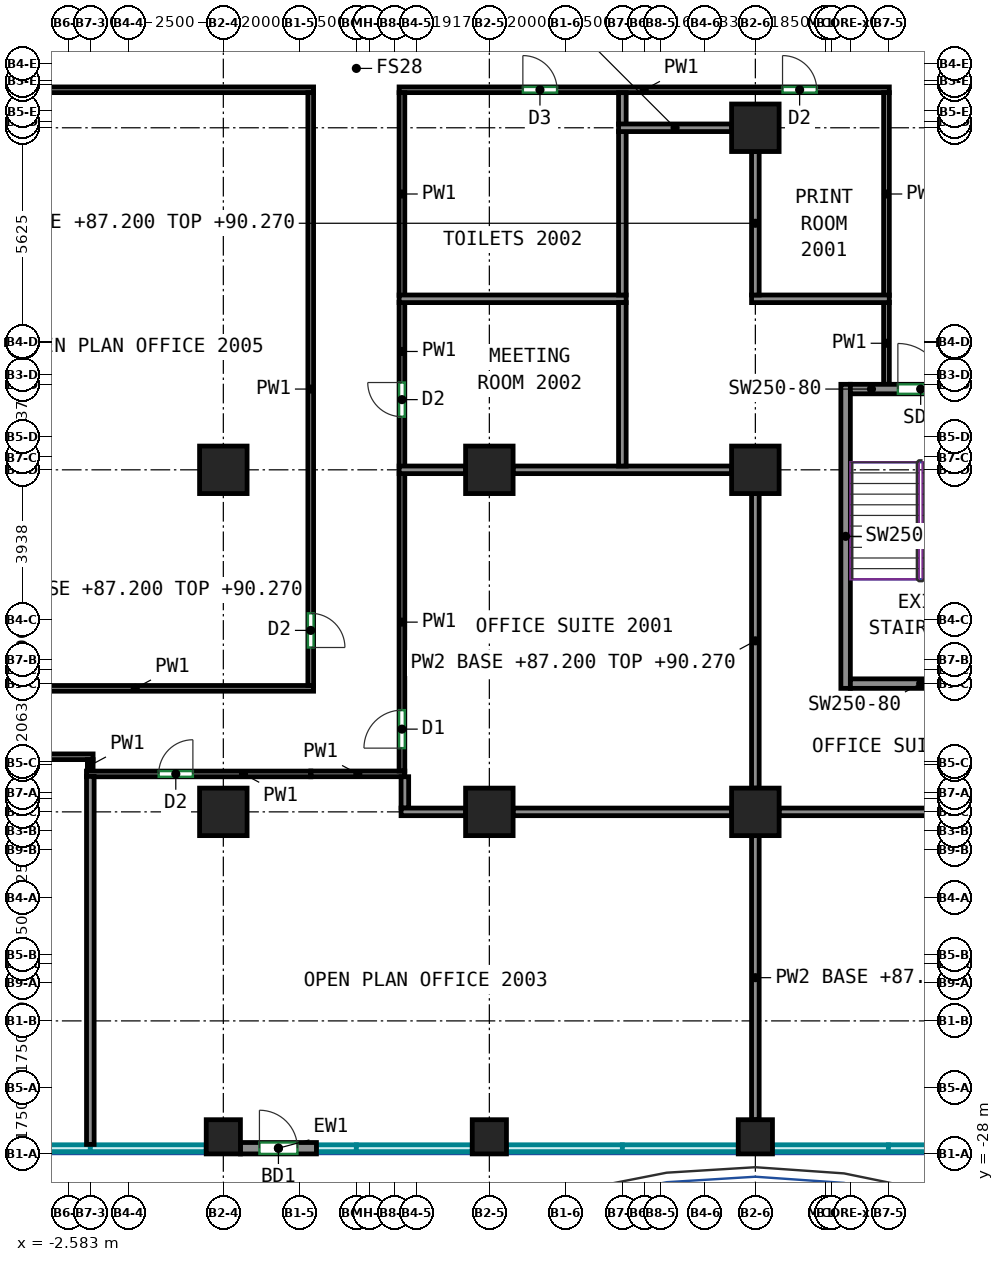
"""IFC4 building model, lengths in metres.
Left out: names, types, materials, properties, quantities, classifications, styles, units other than length and angle.
Written with IfcOpenShell. Run it as: python <this file> out.ifc"""

import sys

from ifc_helpers import new_model, si_unit, direction, frame, frame_2d, origin, origin_2d, place, context, subcontext, project, spatial, rectangle, extrude, source, transform, mapped, element, fill, save


model = new_model("IFC4")
c1 = context("Model", 3, precision=1e-05, world=origin(), true_north=direction((0.0, 1.0)))
c2 = subcontext(c1, "Body", "Model", "MODEL_VIEW")
j1 = project(units=[si_unit("LENGTHUNIT", "METRE"), si_unit("PLANEANGLEUNIT", "RADIAN")], contexts=[c1])
p1 = place(None, origin())
s1 = spatial("IfcSite", under=j1, at=p1, CompositionType="ELEMENT")
p2 = place(p1, origin())
s2 = spatial("IfcBuilding", under=s1, at=p2, CompositionType="ELEMENT")
p3 = place(p2, frame((0.0, 0.0, 87.2)))
s3 = spatial("IfcBuildingStorey", under=s2, at=p3, CompositionType="ELEMENT", Elevation=87.2)
m1 = source(origin(), c2, "Body", "SweptSolid", [
    extrude(rectangle(XDim=0.9, YDim=0.9, at=origin_2d()), origin(), (0.0, 0.0, 1.0), 3.72),
])
p4 = place(p3, frame((1.5, -27.55, 0.0), z_axis=(0.0, 0.0, 1.0), x_axis=(1.0, 0.0, 0.0)))
e1 = element("IfcColumn", 1, at=p4, inside=s3, PredefinedType="COLUMN", context=c2, shape_type="MappedRepresentation", body=[
    mapped(m1, transform((0.0, 0.0, 0.0))),
])
m2 = source(origin(), c2, "Body", "SweptSolid", [
    extrude(rectangle(XDim=1.25, YDim=1.25, at=origin_2d()), origin(), (0.0, 0.0, 1.0), 3.72),
])
for number, where, z_axis, x_axis in (
    (2, (1.5, -19.0, 0.0), (0.0, 0.0, 1.0), (1.0, 0.0, 0.0)),
    (3, (1.5, -10.0, 0.0), (0.0, 0.0, 1.0), (1.0, 0.0, 0.0)),
):
    element("IfcColumn", number, at=place(p3, frame(where, z_axis=z_axis, x_axis=x_axis)), inside=s3, PredefinedType="COLUMN", context=c2, shape_type="MappedRepresentation", body=[
        mapped(m2, transform((0.0, 0.0, 0.0))),
    ])
p5 = place(p3, frame((8.5, -27.55, 0.0), z_axis=(0.0, 0.0, 1.0), x_axis=(1.0, 0.0, 0.0)))
e4 = element("IfcColumn", 4, at=p5, inside=s3, PredefinedType="COLUMN", context=c2, shape_type="MappedRepresentation", body=[
    mapped(m1, transform((0.0, 0.0, 0.0))),
])
for number, where, z_axis, x_axis in (
    (5, (8.5, -19.0, 0.0), (0.0, 0.0, 1.0), (1.0, 0.0, 0.0)),
    (6, (8.5, -10.0, 0.0), (0.0, 0.0, 1.0), (1.0, 0.0, 0.0)),
):
    element("IfcColumn", number, at=place(p3, frame(where, z_axis=z_axis, x_axis=x_axis)), inside=s3, PredefinedType="COLUMN", context=c2, shape_type="MappedRepresentation", body=[
        mapped(m2, transform((0.0, 0.0, 0.0))),
    ])
p6 = place(p3, frame((15.5, -27.55, 0.0), z_axis=(0.0, 0.0, 1.0), x_axis=(1.0, 0.0, 0.0)))
e7 = element("IfcColumn", 7, at=p6, inside=s3, PredefinedType="COLUMN", context=c2, shape_type="MappedRepresentation", body=[
    mapped(m1, transform((0.0, 0.0, 0.0))),
])
for number, where, z_axis, x_axis in (
    (8, (15.5, -19.0, 0.0), (0.0, 0.0, 1.0), (1.0, 0.0, 0.0)),
    (9, (15.5, -10.0, 0.0), (0.0, 0.0, 1.0), (1.0, 0.0, 0.0)),
    (10, (15.5, -1.0, 0.0), (0.0, 0.0, 1.0), (1.0, 0.0, 0.0)),
):
    element("IfcColumn", number, at=place(p3, frame(where, z_axis=z_axis, x_axis=x_axis)), inside=s3, PredefinedType="COLUMN", context=c2, shape_type="MappedRepresentation", body=[
        mapped(m2, transform((0.0, 0.0, 0.0))),
    ])
m3 = source(origin(), c2, "Body", "SweptSolid", [
    extrude(rectangle(XDim=8.0, YDim=0.25, at=frame_2d((4.0, 0.0))), origin(), (0.0, 0.0, 1.0), 3.72),
])
p7 = place(p3, frame((17.875, -15.75, 0.0), z_axis=(0.0, 0.0, 1.0), x_axis=(0.0, 1.0, 0.0)))
e11 = element("IfcWall", 11, at=p7, inside=s3, PredefinedType="SHEAR", context=c2, shape_type="MappedRepresentation", body=[
    mapped(m3, transform((0.0, 0.0, 0.0))),
])
m4 = source(origin(), c2, "Body", "SweptSolid", [
    extrude(rectangle(XDim=3.7, YDim=0.25, at=frame_2d((1.85, 0.0))), origin(), (0.0, 0.0, 1.0), 3.72),
])
p8 = place(p3, frame((18.0, -15.625, 0.0), z_axis=(0.0, 0.0, 1.0), x_axis=(1.0, 0.0, 0.0)))
e12 = element("IfcWall", 12, at=p8, inside=s3, PredefinedType="SHEAR", context=c2, shape_type="MappedRepresentation", body=[
    mapped(m4, transform((0.0, 0.0, 0.0))),
])
p9 = place(p3, frame((18.0, -7.875, 0.0), z_axis=(0.0, 0.0, 1.0), x_axis=(1.0, 0.0, 0.0)))
e13 = element("IfcWall", 13, at=p9, inside=s3, PredefinedType="SHEAR", context=c2, shape_type="MappedRepresentation", body=[
    mapped(m4, transform((0.0, 0.0, 0.0))),
])
p10 = place(p9, frame((1.25, 0.0, 0.0)))
e14 = element("IfcOpeningElement", 14, at=p10, cuts=e13, PredefinedType="OPENING", context=c2, shape_type="SweptSolid", body=[
    extrude(rectangle(XDim=1.2, YDim=2.1, at=frame_2d((0.6, 1.05))), frame((0.0, 0.135, 0.0), z_axis=(0.0, -1.0, 0.0), x_axis=(1.0, 0.0, 0.0)), (0.0, 0.0, 1.0), 0.27),
])
m5 = source(origin(), c2, "Body", "SweptSolid", [
    extrude(rectangle(XDim=2.0, YDim=0.3, at=frame_2d((1.0, 0.0))), origin(), (0.0, 0.0, 1.0), 3.72),
])
p11 = place(p3, frame((1.95, -27.85, 0.0), z_axis=(0.0, 0.0, 1.0), x_axis=(1.0, 0.0, 0.0)))
e15 = element("IfcWall", 15, at=p11, inside=s3, PredefinedType="SOLIDWALL", context=c2, shape_type="MappedRepresentation", body=[
    mapped(m5, transform((0.0, 0.0, 0.0))),
])
p12 = place(p11, frame((0.5, 0.0, 0.0)))
e16 = element("IfcOpeningElement", 16, at=p12, cuts=e15, PredefinedType="OPENING", context=c2, shape_type="SweptSolid", body=[
    extrude(rectangle(XDim=1.0, YDim=2.1, at=frame_2d((0.5, 1.05))), frame((0.0, 0.16, 0.0), z_axis=(0.0, -1.0, 0.0), x_axis=(1.0, 0.0, 0.0)), (0.0, 0.0, 1.0), 0.32),
])
p13 = place(p3, frame((-16.625, -17.55, 0.0), z_axis=(0.0, 0.0, 1.0), x_axis=(1.0, 0.0, 0.0)))
e17 = element("IfcWall", 17, at=p13, inside=s3, PredefinedType="PARTITIONING", context=c2, shape_type="SweptSolid", body=[
    extrude(rectangle(XDim=14.698, YDim=0.15, at=frame_2d((7.349, 0.0))), origin(), (0.0, 0.0, 1.0), 3.72),
])
p14 = place(p13, frame((0.811, 0.0, 0.0)))
e18 = element("IfcOpeningElement", 18, at=p14, cuts=e17, PredefinedType="OPENING", context=c2, shape_type="SweptSolid", body=[
    extrude(rectangle(XDim=1.8, YDim=2.1, at=frame_2d((0.9, 1.05))), frame((0.0, 0.085, 0.0), z_axis=(0.0, -1.0, 0.0), x_axis=(1.0, 0.0, 0.0)), (0.0, 0.0, 1.0), 0.17),
])
p15 = place(p13, frame((4.82, 0.0, 0.0)))
e19 = element("IfcOpeningElement", 19, at=p15, cuts=e17, PredefinedType="OPENING", context=c2, shape_type="SweptSolid", body=[
    extrude(rectangle(XDim=0.9, YDim=2.1, at=frame_2d((0.45, 1.05))), frame((0.0, 0.085, 0.0), z_axis=(0.0, -1.0, 0.0), x_axis=(1.0, 0.0, 0.0)), (0.0, 0.0, 1.0), 0.17),
])
p16 = place(p3, frame((-2.002, -17.625, 0.0), z_axis=(0.0, 0.0, 1.0), x_axis=(0.0, -1.0, 0.0)))
e20 = element("IfcWall", 20, at=p16, inside=s3, PredefinedType="PARTITIONING", context=c2, shape_type="SweptSolid", body=[
    extrude(rectangle(XDim=0.302, YDim=0.15, at=frame_2d((0.151, 0.0))), origin(), (0.0, 0.0, 1.0), 3.72),
])
p17 = place(p3, frame((3.802, -18.0, 0.0), z_axis=(0.0, 0.0, 1.0), x_axis=(1.0, 0.0, 0.0)))
e21 = element("IfcWall", 21, at=p17, inside=s3, PredefinedType="PARTITIONING", context=c2, shape_type="SweptSolid", body=[
    extrude(rectangle(XDim=2.473, YDim=0.15, at=frame_2d((1.236, 0.0))), origin(), (0.0, 0.0, 1.0), 3.72),
])
p18 = place(p3, frame((-2.102, -18.002, 0.0), z_axis=(0.0, 0.0, 1.0), x_axis=(1.0, 0.0, 0.0)))
e22 = element("IfcWall", 22, at=p18, inside=s3, PredefinedType="PARTITIONING", context=c2, shape_type="SweptSolid", body=[
    extrude(rectangle(XDim=5.904, YDim=0.15, at=frame_2d((2.952, 0.0))), origin(), (0.0, 0.0, 1.0), 3.72),
])
p19 = place(p18, frame((1.901, 0.0, 0.0)))
e23 = element("IfcOpeningElement", 23, at=p19, cuts=e22, PredefinedType="OPENING", context=c2, shape_type="SweptSolid", body=[
    extrude(rectangle(XDim=0.9, YDim=2.1, at=frame_2d((0.45, 1.05))), frame((0.0, 0.085, 0.0), z_axis=(0.0, -1.0, 0.0), x_axis=(1.0, 0.0, 0.0)), (0.0, 0.0, 1.0), 0.17),
])
p20 = place(p3, frame((-19.325, 0.0, 0.0), z_axis=(0.0, 0.0, 1.0), x_axis=(1.0, 0.0, 0.0)))
e24 = element("IfcWall", 24, at=p20, inside=s3, PredefinedType="PARTITIONING", context=c2, shape_type="SweptSolid", body=[
    extrude(rectangle(XDim=23.2, YDim=0.15, at=frame_2d((11.6, 0.0))), origin(), (0.0, 0.0, 1.0), 3.72),
])
p21 = place(p20, frame((2.215, 0.0, 0.0)))
e25 = element("IfcOpeningElement", 25, at=p21, cuts=e24, PredefinedType="OPENING", context=c2, shape_type="SweptSolid", body=[
    extrude(rectangle(XDim=1.8, YDim=2.1, at=frame_2d((0.9, 1.05))), frame((0.0, 0.085, 0.0), z_axis=(0.0, -1.0, 0.0), x_axis=(1.0, 0.0, 0.0)), (0.0, 0.0, 1.0), 0.17),
])
p22 = place(p3, frame((3.875, -15.75, 0.0), z_axis=(0.0, 0.0, 1.0), x_axis=(-1.0, 0.0, 0.0)))
e26 = element("IfcWall", 26, at=p22, inside=s3, PredefinedType="PARTITIONING", context=c2, shape_type="SweptSolid", body=[
    extrude(rectangle(XDim=9.385, YDim=0.15, at=frame_2d((4.692, 0.0))), origin(), (0.0, 0.0, 1.0), 3.72),
])
p23 = place(p3, frame((3.8, -0.075, 0.0), z_axis=(0.0, 0.0, 1.0), x_axis=(0.0, -1.0, 0.0)))
e27 = element("IfcWall", 27, at=p23, inside=s3, PredefinedType="PARTITIONING", context=c2, shape_type="SweptSolid", body=[
    extrude(rectangle(XDim=15.6, YDim=0.15, at=frame_2d((7.8, 0.0))), origin(), (0.0, 0.0, 1.0), 3.72),
])
p24 = place(p23, frame((13.7, 0.0, 0.0)))
e28 = element("IfcOpeningElement", 28, at=p24, cuts=e27, PredefinedType="OPENING", context=c2, shape_type="SweptSolid", body=[
    extrude(rectangle(XDim=0.9, YDim=2.1, at=frame_2d((0.45, 1.05))), frame((0.0, 0.085, 0.0), z_axis=(0.0, -1.0, 0.0), x_axis=(1.0, 0.0, 0.0)), (0.0, 0.0, 1.0), 0.17),
])
p25 = place(p3, frame((6.2, -17.925, 0.0), z_axis=(0.0, 0.0, 1.0), x_axis=(0.0, 1.0, 0.0)))
e29 = element("IfcWall", 29, at=p25, inside=s3, PredefinedType="PARTITIONING", context=c2, shape_type="SweptSolid", body=[
    extrude(rectangle(XDim=7.835, YDim=0.15, at=frame_2d((3.917, 0.0))), origin(), (0.0, 0.0, 1.0), 3.72),
])
p26 = place(p25, frame((0.602, 0.0, 0.0)))
e30 = element("IfcOpeningElement", 30, at=p26, cuts=e29, PredefinedType="OPENING", context=c2, shape_type="SweptSolid", body=[
    extrude(rectangle(XDim=1.0, YDim=2.1, at=frame_2d((0.5, 1.05))), frame((0.0, 0.085, 0.0), z_axis=(0.0, -1.0, 0.0), x_axis=(1.0, 0.0, 0.0)), (0.0, 0.0, 1.0), 0.17),
])
p27 = place(p3, frame((6.2, -9.91, 0.0), z_axis=(0.0, 0.0, 1.0), x_axis=(0.0, 1.0, 0.0)))
e31 = element("IfcWall", 31, at=p27, inside=s3, PredefinedType="PARTITIONING", context=c2, shape_type="SweptSolid", body=[
    extrude(rectangle(XDim=4.32, YDim=0.15, at=frame_2d((2.16, 0.0))), origin(), (0.0, 0.0, 1.0), 3.72),
])
p28 = place(p27, frame((1.307, 0.0, 0.0)))
e32 = element("IfcOpeningElement", 32, at=p28, cuts=e31, PredefinedType="OPENING", context=c2, shape_type="SweptSolid", body=[
    extrude(rectangle(XDim=0.9, YDim=2.1, at=frame_2d((0.45, 1.05))), frame((0.0, 0.085, 0.0), z_axis=(0.0, -1.0, 0.0), x_axis=(1.0, 0.0, 0.0)), (0.0, 0.0, 1.0), 0.17),
])
p29 = place(p3, frame((6.125, 0.0, 0.0), z_axis=(0.0, 0.0, 1.0), x_axis=(1.0, 0.0, 0.0)))
e33 = element("IfcWall", 33, at=p29, inside=s3, PredefinedType="PARTITIONING", context=c2, shape_type="SweptSolid", body=[
    extrude(rectangle(XDim=12.9, YDim=0.15, at=frame_2d((6.45, 0.0))), origin(), (0.0, 0.0, 1.0), 3.72),
])
p30 = place(p29, frame((3.257, 0.0, 0.0)))
e34 = element("IfcOpeningElement", 34, at=p30, cuts=e33, PredefinedType="OPENING", context=c2, shape_type="SweptSolid", body=[
    extrude(rectangle(XDim=0.9, YDim=2.1, at=frame_2d((0.45, 1.05))), frame((0.0, 0.085, 0.0), z_axis=(0.0, -1.0, 0.0), x_axis=(1.0, 0.0, 0.0)), (0.0, 0.0, 1.0), 0.17),
])
p31 = place(p29, frame((10.09, 0.0, 0.0)))
e35 = element("IfcOpeningElement", 35, at=p31, cuts=e33, PredefinedType="OPENING", context=c2, shape_type="SweptSolid", body=[
    extrude(rectangle(XDim=0.9, YDim=2.1, at=frame_2d((0.45, 1.05))), frame((0.0, 0.085, 0.0), z_axis=(0.0, -1.0, 0.0), x_axis=(1.0, 0.0, 0.0)), (0.0, 0.0, 1.0), 0.17),
])
for number, where, z_axis, x_axis in (
    (36, (6.2, -5.41, 0.0), (0.0, 0.0, 1.0), (0.0, 1.0, 0.0)),
    (37, (18.95, -5.41, 0.0), (0.0, 0.0, 1.0), (0.0, 1.0, 0.0)),
):
    element("IfcWall", number, at=place(p3, frame(where, z_axis=z_axis, x_axis=x_axis)), inside=s3, PredefinedType="PARTITIONING", context=c2, shape_type="SweptSolid", body=[
        extrude(rectangle(XDim=5.335, YDim=0.15, at=frame_2d((2.667, 0.0))), origin(), (0.0, 0.0, 1.0), 3.72),
    ])
p32 = place(p3, frame((18.95, -7.75, 0.0), z_axis=(0.0, 0.0, 1.0), x_axis=(0.0, 1.0, 0.0)))
e38 = element("IfcWall", 38, at=p32, inside=s3, PredefinedType="PARTITIONING", context=c2, shape_type="SweptSolid", body=[
    extrude(rectangle(XDim=2.16, YDim=0.15, at=frame_2d((1.08, 0.0))), origin(), (0.0, 0.0, 1.0), 3.72),
])
p33 = place(p3, frame((-2.0, -27.75, 0.0), z_axis=(0.0, 0.0, 1.0), x_axis=(0.0, 1.0, 0.0)))
e39 = element("IfcWall", 39, at=p33, inside=s3, PredefinedType="PARTITIONING", context=c2, shape_type="SweptSolid", body=[
    extrude(rectangle(XDim=9.683, YDim=0.2, at=frame_2d((4.842, 0.0))), origin(), (0.0, 0.0, 1.0), 3.72),
])
p34 = place(p3, frame((6.277, -18.9, 0.0), z_axis=(0.0, 0.0, 1.0), x_axis=(0.0, 1.0, 0.0)))
e40 = element("IfcWall", 40, at=p34, inside=s3, PredefinedType="PARTITIONING", context=c2, shape_type="SweptSolid", body=[
    extrude(rectangle(XDim=0.825, YDim=0.2, at=frame_2d((0.413, 0.0))), origin(), (0.0, 0.0, 1.0), 3.72),
])
p35 = place(p3, frame((6.177, -19.0, 0.0), z_axis=(0.0, 0.0, 1.0), x_axis=(1.0, 0.0, 0.0)))
e41 = element("IfcWall", 41, at=p35, inside=s3, PredefinedType="PARTITIONING", context=c2, shape_type="SweptSolid", body=[
    extrude(rectangle(XDim=1.698, YDim=0.2, at=frame_2d((0.849, 0.0))), origin(), (0.0, 0.0, 1.0), 3.72),
])
p36 = place(p3, frame((9.125, -19.0, 0.0), z_axis=(0.0, 0.0, 1.0), x_axis=(1.0, 0.0, 0.0)))
e42 = element("IfcWall", 42, at=p36, inside=s3, PredefinedType="PARTITIONING", context=c2, shape_type="SweptSolid", body=[
    extrude(rectangle(XDim=5.75, YDim=0.2, at=frame_2d((2.875, 0.0))), origin(), (0.0, 0.0, 1.0), 3.72),
])
p37 = place(p3, frame((15.5, -27.1, 0.0), z_axis=(0.0, 0.0, 1.0), x_axis=(0.0, 1.0, 0.0)))
e43 = element("IfcWall", 43, at=p37, inside=s3, PredefinedType="PARTITIONING", context=c2, shape_type="SweptSolid", body=[
    extrude(rectangle(XDim=7.475, YDim=0.2, at=frame_2d((3.738, 0.0))), origin(), (0.0, 0.0, 1.0), 3.07),
])
p38 = place(p3, frame((9.125, -10.0, 0.0), z_axis=(0.0, 0.0, 1.0), x_axis=(1.0, 0.0, 0.0)))
e44 = element("IfcWall", 44, at=p38, inside=s3, PredefinedType="PARTITIONING", context=c2, shape_type="SweptSolid", body=[
    extrude(rectangle(XDim=5.75, YDim=0.2, at=frame_2d((2.875, 0.0))), origin(), (0.0, 0.0, 1.0), 3.72),
])
p39 = place(p3, frame((6.126, -10.0, 0.0), z_axis=(0.0, 0.0, 1.0), x_axis=(1.0, 0.0, 0.0)))
e45 = element("IfcWall", 45, at=p39, inside=s3, PredefinedType="PARTITIONING", context=c2, shape_type="SweptSolid", body=[
    extrude(rectangle(XDim=1.749, YDim=0.2, at=frame_2d((0.875, 0.0))), origin(), (0.0, 0.0, 1.0), 3.72),
])
p40 = place(p3, frame((15.5, -18.375, 0.0), z_axis=(0.0, 0.0, 1.0), x_axis=(0.0, 1.0, 0.0)))
e46 = element("IfcWall", 46, at=p40, inside=s3, PredefinedType="PARTITIONING", context=c2, shape_type="SweptSolid", body=[
    extrude(rectangle(XDim=7.75, YDim=0.2, at=frame_2d((3.875, 0.0))), origin(), (0.0, 0.0, 1.0), 3.07),
])
p41 = place(p3, frame((6.126, -5.5, 0.0), z_axis=(0.0, 0.0, 1.0), x_axis=(1.0, 0.0, 0.0)))
e47 = element("IfcWall", 47, at=p41, inside=s3, PredefinedType="PARTITIONING", context=c2, shape_type="SweptSolid", body=[
    extrude(rectangle(XDim=5.974, YDim=0.2, at=frame_2d((2.987, 0.0))), origin(), (0.0, 0.0, 1.0), 3.72),
])
p42 = place(p3, frame((12.0, -9.9, 0.0), z_axis=(0.0, 0.0, 1.0), x_axis=(0.0, 1.0, 0.0)))
e48 = element("IfcWall", 48, at=p42, inside=s3, PredefinedType="PARTITIONING", context=c2, shape_type="SweptSolid", body=[
    extrude(rectangle(XDim=4.3, YDim=0.2, at=frame_2d((2.15, 0.0))), origin(), (0.0, 0.0, 1.0), 3.72),
])
p43 = place(p3, frame((12.0, -0.91, 0.0), z_axis=(0.0, 0.0, 1.0), x_axis=(0.0, 1.0, 0.0)))
e49 = element("IfcWall", 49, at=p43, inside=s3, PredefinedType="PARTITIONING", context=c2, shape_type="SweptSolid", body=[
    extrude(rectangle(XDim=0.834, YDim=0.2, at=frame_2d((0.417, 0.0))), origin(), (0.0, 0.0, 1.0), 3.72),
])
p44 = place(p3, frame((12.0, -5.4, 0.0), z_axis=(0.0, 0.0, 1.0), x_axis=(0.0, 1.0, 0.0)))
e50 = element("IfcWall", 50, at=p44, inside=s3, PredefinedType="PARTITIONING", context=c2, shape_type="SweptSolid", body=[
    extrude(rectangle(XDim=4.31, YDim=0.2, at=frame_2d((2.155, 0.0))), origin(), (0.0, 0.0, 1.0), 3.72),
])
p45 = place(p3, frame((15.4, -5.5, 0.0), z_axis=(0.0, 0.0, 1.0), x_axis=(1.0, 0.0, 0.0)))
e51 = element("IfcWall", 51, at=p45, inside=s3, PredefinedType="PARTITIONING", context=c2, shape_type="SweptSolid", body=[
    extrude(rectangle(XDim=3.624, YDim=0.2, at=frame_2d((1.812, 0.0))), origin(), (0.0, 0.0, 1.0), 3.72),
])
p46 = place(p3, frame((15.5, -5.4, 0.0), z_axis=(0.0, 0.0, 1.0), x_axis=(0.0, 1.0, 0.0)))
e52 = element("IfcWall", 52, at=p46, inside=s3, PredefinedType="PARTITIONING", context=c2, shape_type="SweptSolid", body=[
    extrude(rectangle(XDim=3.775, YDim=0.2, at=frame_2d((1.887, 0.0))), origin(), (0.0, 0.0, 1.0), 3.07),
])
p47 = place(p3, frame((11.9, -1.0, 0.0), z_axis=(0.0, 0.0, 1.0), x_axis=(1.0, 0.0, 0.0)))
e53 = element("IfcWall", 53, at=p47, inside=s3, PredefinedType="PARTITIONING", context=c2, shape_type="SweptSolid", body=[
    extrude(rectangle(XDim=2.975, YDim=0.2, at=frame_2d((1.488, 0.0))), origin(), (0.0, 0.0, 1.0), 3.07),
])
p48 = place(p3, frame((16.125, -19.0, 0.0), z_axis=(0.0, 0.0, 1.0), x_axis=(1.0, 0.0, 0.0)))
e54 = element("IfcWall", 54, at=p48, inside=s3, PredefinedType="PARTITIONING", context=c2, shape_type="SweptSolid", body=[
    extrude(rectangle(XDim=5.75, YDim=0.2, at=frame_2d((2.875, 0.0))), origin(), (0.0, 0.0, 1.0), 3.72),
])
p49 = place(p12, origin())
e55 = element("IfcDoor", 55, at=p49, inside=s3, OperationType="SINGLE_SWING_LEFT", PredefinedType="DOOR", context=c2, shape_type="SweptSolid", body=[
    extrude(rectangle(XDim=1.0, YDim=2.1, at=frame_2d((0.5, 1.05))), frame((0.0, 0.025, 0.0), z_axis=(0.0, -1.0, 0.0), x_axis=(1.0, 0.0, 0.0)), (0.0, 0.0, 1.0), 0.05),
])
fill(e16, e55)
p50 = place(p10, origin())
e56 = element("IfcDoor", 56, at=p50, inside=s3, OperationType="DOUBLE_DOOR_SINGLE_SWING", PredefinedType="DOOR", context=c2, shape_type="SweptSolid", body=[
    extrude(rectangle(XDim=1.2, YDim=2.1, at=frame_2d((0.6, 1.05))), frame((0.0, 0.025, 0.0), z_axis=(0.0, -1.0, 0.0), x_axis=(1.0, 0.0, 0.0)), (0.0, 0.0, 1.0), 0.05),
])
fill(e14, e56)
p51 = place(p19, origin())
e57 = element("IfcDoor", 57, at=p51, inside=s3, OperationType="SINGLE_SWING_RIGHT", PredefinedType="DOOR", context=c2, shape_type="SweptSolid", body=[
    extrude(rectangle(XDim=0.9, YDim=2.1, at=frame_2d((0.45, 1.05))), frame((0.0, 0.025, 0.0), z_axis=(0.0, -1.0, 0.0), x_axis=(1.0, 0.0, 0.0)), (0.0, 0.0, 1.0), 0.05),
])
fill(e23, e57)
p52 = place(p26, origin())
e58 = element("IfcDoor", 58, at=p52, inside=s3, OperationType="SINGLE_SWING_LEFT", PredefinedType="DOOR", context=c2, shape_type="SweptSolid", body=[
    extrude(rectangle(XDim=1.0, YDim=2.1, at=frame_2d((0.5, 1.05))), frame((0.0, 0.025, 0.0), z_axis=(0.0, -1.0, 0.0), x_axis=(1.0, 0.0, 0.0)), (0.0, 0.0, 1.0), 0.05),
])
fill(e30, e58)
p53 = place(p24, origin())
e59 = element("IfcDoor", 59, at=p53, inside=s3, OperationType="SINGLE_SWING_RIGHT", PredefinedType="DOOR", context=c2, shape_type="SweptSolid", body=[
    extrude(rectangle(XDim=0.9, YDim=2.1, at=frame_2d((0.45, 1.05))), frame((0.0, 0.025, 0.0), z_axis=(0.0, -1.0, 0.0), x_axis=(1.0, 0.0, 0.0)), (0.0, 0.0, 1.0), 0.05),
])
fill(e28, e59)
p54 = place(p28, origin())
e60 = element("IfcDoor", 60, at=p54, inside=s3, OperationType="SINGLE_SWING_RIGHT", PredefinedType="DOOR", context=c2, shape_type="SweptSolid", body=[
    extrude(rectangle(XDim=0.9, YDim=2.1, at=frame_2d((0.45, 1.05))), frame((0.0, 0.025, 0.0), z_axis=(0.0, -1.0, 0.0), x_axis=(1.0, 0.0, 0.0)), (0.0, 0.0, 1.0), 0.05),
])
fill(e32, e60)
p55 = place(p30, origin())
e61 = element("IfcDoor", 61, at=p55, inside=s3, OperationType="SINGLE_SWING_LEFT", PredefinedType="DOOR", context=c2, shape_type="SweptSolid", body=[
    extrude(rectangle(XDim=0.9, YDim=2.1, at=frame_2d((0.45, 1.05))), frame((0.0, 0.025, 0.0), z_axis=(0.0, -1.0, 0.0), x_axis=(1.0, 0.0, 0.0)), (0.0, 0.0, 1.0), 0.05),
])
fill(e34, e61)
p56 = place(p31, origin())
e62 = element("IfcDoor", 62, at=p56, inside=s3, OperationType="SINGLE_SWING_LEFT", PredefinedType="DOOR", context=c2, shape_type="SweptSolid", body=[
    extrude(rectangle(XDim=0.9, YDim=2.1, at=frame_2d((0.45, 1.05))), frame((0.0, 0.025, 0.0), z_axis=(0.0, -1.0, 0.0), x_axis=(1.0, 0.0, 0.0)), (0.0, 0.0, 1.0), 0.05),
])
fill(e35, e62)
save(model, sys.argv[1])
